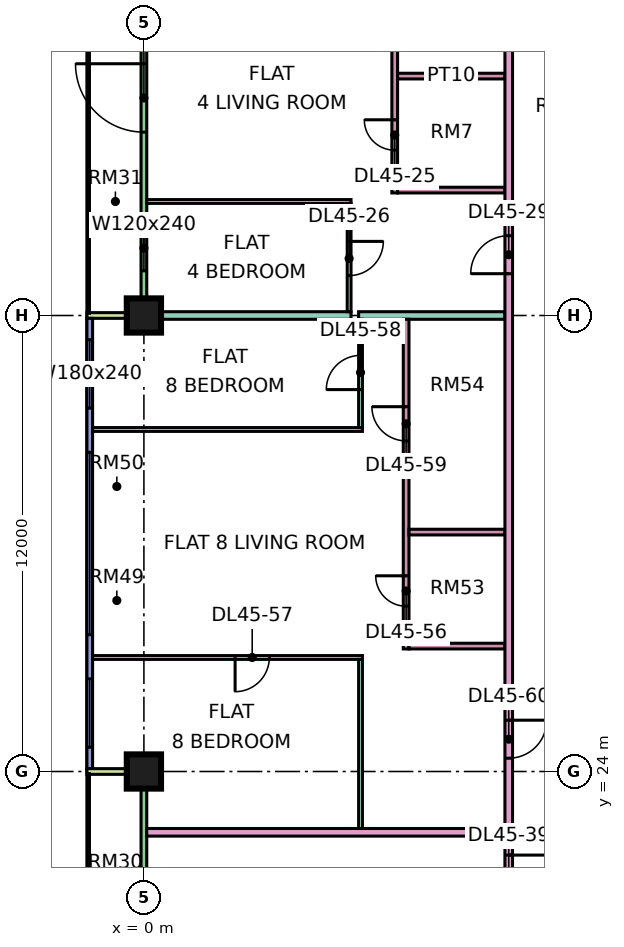
"""IFC4 building model, lengths in metres.
Left out: names, types, materials, properties, quantities, classifications, styles, units other than length and angle.
Written with IfcOpenShell. Run it as: python <this file> out.ifc"""

import sys

from ifc_helpers import new_model, si_unit, direction, frame, frame_2d, origin, origin_2d, place, context, subcontext, project, spatial, rectangle, extrude, element, fill, save


model = new_model("IFC4")
c1 = context("Model", 3, precision=1e-05, world=origin(), true_north=direction((0.0, 1.0)))
c2 = subcontext(c1, "Body", "Model", "MODEL_VIEW")
j1 = project(units=[si_unit("LENGTHUNIT", "METRE"), si_unit("PLANEANGLEUNIT", "RADIAN")], contexts=[c1])
p1 = place(None, origin())
s1 = spatial("IfcSite", under=j1, at=p1, CompositionType="ELEMENT")
p2 = place(p1, origin())
s2 = spatial("IfcBuilding", under=s1, at=p2, CompositionType="ELEMENT")
p3 = place(p2, frame((0.0, 0.0, 194.9)))
s3 = spatial("IfcBuildingStorey", under=s2, at=p3, CompositionType="ELEMENT", Elevation=194.9)
p4 = place(p3, frame((0.0, 24.0, 0.0), z_axis=(0.0, 0.0, 1.0), x_axis=(1.0, 0.0, 0.0)))
e1 = element("IfcColumn", 1, at=p4, inside=s3, PredefinedType="COLUMN", context=c2, shape_type="SweptSolid", body=[
    extrude(rectangle(XDim=0.9, YDim=0.9, at=origin_2d()), origin(), (0.0, 0.0, 1.0), 3.75),
])
p5 = place(p3, frame((0.0, 36.0, 0.0), z_axis=(0.0, 0.0, 1.0), x_axis=(1.0, 0.0, 0.0)))
e2 = element("IfcColumn", 2, at=p5, inside=s3, PredefinedType="COLUMN", context=c2, shape_type="SweptSolid", body=[
    extrude(rectangle(XDim=0.9, YDim=0.9, at=origin_2d()), origin(), (0.0, 0.0, 1.0), 3.75),
])
p6 = place(p3, frame((0.0, 47.925, 0.0), z_axis=(0.0, 0.0, 1.0), x_axis=(0.0, -1.0, 0.0)))
e3 = element("IfcWall", 3, at=p6, inside=s3, PredefinedType="SOLIDWALL", context=c2, shape_type="SweptSolid", body=[
    extrude(rectangle(XDim=11.85, YDim=0.15, at=frame_2d((5.925, 0.0))), origin(), (0.0, 0.0, 1.0), 3.35),
])
p7 = place(p6, frame((0.587, 0.0, 0.45)))
e4 = element("IfcOpeningElement", 4, at=p7, cuts=e3, PredefinedType="OPENING", context=c2, shape_type="SweptSolid", body=[
    extrude(rectangle(XDim=1.2, YDim=2.4, at=frame_2d((0.6, 1.2))), frame((0.0, 0.085, 0.0), z_axis=(0.0, -1.0, 0.0), x_axis=(1.0, 0.0, 0.0)), (0.0, 0.0, 1.0), 0.17),
])
p8 = place(p6, frame((5.3, 0.0, 0.0)))
e5 = element("IfcOpeningElement", 5, at=p8, cuts=e3, PredefinedType="OPENING", context=c2, shape_type="SweptSolid", body=[
    extrude(rectangle(XDim=1.8, YDim=2.4, at=frame_2d((0.9, 1.2))), frame((0.0, 0.085, 0.0), z_axis=(0.0, -1.0, 0.0), x_axis=(1.0, 0.0, 0.0)), (0.0, 0.0, 1.0), 0.17),
])
p9 = place(p6, frame((9.55, 0.0, 0.45)))
e6 = element("IfcOpeningElement", 6, at=p9, cuts=e3, PredefinedType="OPENING", context=c2, shape_type="SweptSolid", body=[
    extrude(rectangle(XDim=1.2, YDim=2.4, at=frame_2d((0.6, 1.2))), frame((0.0, 0.085, 0.0), z_axis=(0.0, -1.0, 0.0), x_axis=(1.0, 0.0, 0.0)), (0.0, 0.0, 1.0), 0.17),
])
p10 = place(p3, frame((-1.5, 36.0, 0.0), z_axis=(0.0, 0.0, 1.0), x_axis=(1.0, 0.0, 0.0)))
e7 = element("IfcWall", 7, at=p10, inside=s3, PredefinedType="SOLIDWALL", context=c2, shape_type="SweptSolid", body=[
    extrude(rectangle(XDim=1.5, YDim=0.15, at=frame_2d((0.75, 0.0))), origin(), (0.0, 0.0, 1.0), 3.35),
])
p11 = place(p3, frame((-1.425, 35.925, 0.0), z_axis=(0.0, 0.0, 1.0), x_axis=(0.0, -1.0, 0.0)))
e8 = element("IfcWall", 8, at=p11, inside=s3, PredefinedType="SOLIDWALL", context=c2, shape_type="SweptSolid", body=[
    extrude(rectangle(XDim=11.85, YDim=0.15, at=frame_2d((5.925, 0.0))), origin(), (0.0, 0.0, 1.0), 3.35),
])
p12 = place(p11, frame((0.562, 0.0, 0.45)))
e9 = element("IfcOpeningElement", 9, at=p12, cuts=e8, PredefinedType="OPENING", context=c2, shape_type="SweptSolid", body=[
    extrude(rectangle(XDim=1.8, YDim=2.4, at=frame_2d((0.9, 1.2))), frame((0.0, 0.085, 0.0), z_axis=(0.0, -1.0, 0.0), x_axis=(1.0, 0.0, 0.0)), (0.0, 0.0, 1.0), 0.17),
])
p13 = place(p11, frame((3.525, 0.0, 0.45)))
e10 = element("IfcOpeningElement", 10, at=p13, cuts=e8, PredefinedType="OPENING", context=c2, shape_type="SweptSolid", body=[
    extrude(rectangle(XDim=4.8, YDim=2.4, at=frame_2d((2.4, 1.2))), frame((0.0, 0.085, 0.0), z_axis=(0.0, -1.0, 0.0), x_axis=(1.0, 0.0, 0.0)), (0.0, 0.0, 1.0), 0.17),
])
p14 = place(p11, frame((9.488, 0.0, 0.45)))
e11 = element("IfcOpeningElement", 11, at=p14, cuts=e8, PredefinedType="OPENING", context=c2, shape_type="SweptSolid", body=[
    extrude(rectangle(XDim=1.8, YDim=2.4, at=frame_2d((0.9, 1.2))), frame((0.0, 0.085, 0.0), z_axis=(0.0, -1.0, 0.0), x_axis=(1.0, 0.0, 0.0)), (0.0, 0.0, 1.0), 0.17),
])
p15 = place(p3, frame((0.0, 23.925, 0.0), z_axis=(0.0, 0.0, 1.0), x_axis=(0.0, -1.0, 0.0)))
e12 = element("IfcWall", 12, at=p15, inside=s3, PredefinedType="SOLIDWALL", context=c2, shape_type="SweptSolid", body=[
    extrude(rectangle(XDim=11.35, YDim=0.15, at=frame_2d((5.675, 0.0))), origin(), (0.0, 0.0, 1.0), 3.35),
])
p16 = place(p15, frame((6.738, 0.0, 0.0)))
e13 = element("IfcOpeningElement", 13, at=p16, cuts=e12, PredefinedType="OPENING", context=c2, shape_type="SweptSolid", body=[
    extrude(rectangle(XDim=1.8, YDim=2.4, at=frame_2d((0.9, 1.2))), frame((0.0, 0.085, 0.0), z_axis=(0.0, -1.0, 0.0), x_axis=(1.0, 0.0, 0.0)), (0.0, 0.0, 1.0), 0.17),
])
p17 = place(p3, frame((-1.5, 24.0, 0.0), z_axis=(0.0, 0.0, 1.0), x_axis=(1.0, 0.0, 0.0)))
e14 = element("IfcWall", 14, at=p17, inside=s3, PredefinedType="SOLIDWALL", context=c2, shape_type="SweptSolid", body=[
    extrude(rectangle(XDim=1.5, YDim=0.15, at=frame_2d((0.75, 0.0))), origin(), (0.0, 0.0, 1.0), 3.35),
])
p18 = place(p3, frame((-1.35, 27.0, 0.0), z_axis=(0.0, 0.0, 1.0), x_axis=(1.0, 0.0, 0.0)))
e15 = element("IfcWall", 15, at=p18, inside=s3, PredefinedType="PARTITIONING", context=c2, shape_type="SweptSolid", body=[
    extrude(rectangle(XDim=7.1, YDim=0.1, at=frame_2d((3.55, 0.0))), origin(), (0.0, 0.0, 1.0), 3.35),
])
p19 = place(p18, frame((3.75, 0.0, 0.0)))
e16 = element("IfcOpeningElement", 16, at=p19, cuts=e15, PredefinedType="OPENING", context=c2, shape_type="SweptSolid", body=[
    extrude(rectangle(XDim=0.9, YDim=2.1, at=frame_2d((0.45, 1.05))), frame((0.0, 0.06, 0.0), z_axis=(0.0, -1.0, 0.0), x_axis=(1.0, 0.0, 0.0)), (0.0, 0.0, 1.0), 0.12),
])
p20 = place(p3, frame((-1.35, 33.0, 0.0), z_axis=(0.0, 0.0, 1.0), x_axis=(1.0, 0.0, 0.0)))
e17 = element("IfcWall", 17, at=p20, inside=s3, PredefinedType="PARTITIONING", context=c2, shape_type="SweptSolid", body=[
    extrude(rectangle(XDim=7.1, YDim=0.1, at=frame_2d((3.55, 0.0))), origin(), (0.0, 0.0, 1.0), 3.35),
])
e18 = element("IfcWall", 18, at=p5, inside=s3, PredefinedType="PARTITIONING", context=c2, shape_type="SweptSolid", body=[
    extrude(rectangle(XDim=5.45, YDim=0.2, at=frame_2d((2.725, 0.0))), origin(), (0.0, 0.0, 1.0), 3.35),
])
p21 = place(p3, frame((0.074, 22.4, 0.0), z_axis=(0.0, 0.0, 1.0), x_axis=(1.0, 0.0, 0.0)))
e19 = element("IfcWall", 19, at=p21, inside=s3, PredefinedType="PARTITIONING", context=c2, shape_type="SweptSolid", body=[
    extrude(rectangle(XDim=9.426, YDim=0.2, at=frame_2d((4.713, 0.0))), origin(), (0.0, 0.0, 1.0), 3.35),
])
p22 = place(p3, frame((0.074, 39.0, 0.0), z_axis=(0.0, 0.0, 1.0), x_axis=(1.0, 0.0, 0.0)))
e20 = element("IfcWall", 20, at=p22, inside=s3, PredefinedType="PARTITIONING", context=c2, shape_type="SweptSolid", body=[
    extrude(rectangle(XDim=5.376, YDim=0.1, at=frame_2d((2.688, 0.0))), origin(), (0.0, 0.0, 1.0), 3.35),
])
p23 = place(p3, frame((5.4, 36.1, 0.0), z_axis=(0.0, 0.0, 1.0), x_axis=(0.0, 1.0, 0.0)))
e21 = element("IfcWall", 21, at=p23, inside=s3, PredefinedType="PARTITIONING", context=c2, shape_type="SweptSolid", body=[
    extrude(rectangle(XDim=2.85, YDim=0.1, at=frame_2d((1.425, 0.0))), origin(), (0.0, 0.0, 1.0), 3.35),
])
p24 = place(p23, frame((0.95, 0.0, 0.0)))
e22 = element("IfcOpeningElement", 22, at=p24, cuts=e21, PredefinedType="OPENING", context=c2, shape_type="SweptSolid", body=[
    extrude(rectangle(XDim=0.9, YDim=2.1, at=frame_2d((0.45, 1.05))), frame((0.0, 0.06, 0.0), z_axis=(0.0, -1.0, 0.0), x_axis=(1.0, 0.0, 0.0)), (0.0, 0.0, 1.0), 0.12),
])
p25 = place(p3, frame((5.65, 36.0, 0.0), z_axis=(0.0, 0.0, 1.0), x_axis=(1.0, 0.0, 0.0)))
e23 = element("IfcWall", 23, at=p25, inside=s3, PredefinedType="PARTITIONING", context=c2, shape_type="SweptSolid", body=[
    extrude(rectangle(XDim=3.85, YDim=0.2, at=frame_2d((1.925, 0.0))), origin(), (0.0, 0.0, 1.0), 3.35),
])
p26 = place(p3, frame((5.7, 22.5, 0.0), z_axis=(0.0, 0.0, 1.0), x_axis=(0.0, 1.0, 0.0)))
e24 = element("IfcWall", 24, at=p26, inside=s3, PredefinedType="PARTITIONING", context=c2, shape_type="SweptSolid", body=[
    extrude(rectangle(XDim=4.45, YDim=0.1, at=frame_2d((2.225, 0.0))), origin(), (0.0, 0.0, 1.0), 3.35),
])
p27 = place(p3, frame((5.7, 33.05, 0.0), z_axis=(0.0, 0.0, 1.0), x_axis=(0.0, 1.0, 0.0)))
e25 = element("IfcWall", 25, at=p27, inside=s3, PredefinedType="PARTITIONING", context=c2, shape_type="SweptSolid", body=[
    extrude(rectangle(XDim=2.85, YDim=0.1, at=frame_2d((1.425, 0.0))), origin(), (0.0, 0.0, 1.0), 3.35),
])
p28 = place(p27, frame((1.0, 0.0, 0.0)))
e26 = element("IfcOpeningElement", 26, at=p28, cuts=e25, PredefinedType="OPENING", context=c2, shape_type="SweptSolid", body=[
    extrude(rectangle(XDim=0.9, YDim=2.1, at=frame_2d((0.45, 1.05))), frame((0.0, 0.06, 0.0), z_axis=(0.0, -1.0, 0.0), x_axis=(1.0, 0.0, 0.0)), (0.0, 0.0, 1.0), 0.12),
])
p29 = place(p3, frame((6.6, 39.225, 0.0), z_axis=(0.0, 0.0, 1.0), x_axis=(0.0, 1.0, 0.0)))
e27 = element("IfcWall", 27, at=p29, inside=s3, PredefinedType="PARTITIONING", context=c2, shape_type="SweptSolid", body=[
    extrude(rectangle(XDim=8.675, YDim=0.15, at=frame_2d((4.337, 0.0))), origin(), (0.0, 0.0, 1.0), 3.35),
])
p30 = place(p29, frame((1.125, 0.0, 0.0)))
e28 = element("IfcOpeningElement", 28, at=p30, cuts=e27, PredefinedType="OPENING", context=c2, shape_type="SweptSolid", body=[
    extrude(rectangle(XDim=0.8, YDim=2.1, at=frame_2d((0.4, 1.05))), frame((0.0, 0.085, 0.0), z_axis=(0.0, -1.0, 0.0), x_axis=(1.0, 0.0, 0.0)), (0.0, 0.0, 1.0), 0.17),
])
p31 = place(p29, frame((5.475, 0.0, 0.0)))
e29 = element("IfcOpeningElement", 29, at=p31, cuts=e27, PredefinedType="OPENING", context=c2, shape_type="SweptSolid", body=[
    extrude(rectangle(XDim=0.9, YDim=2.1, at=frame_2d((0.45, 1.05))), frame((0.0, 0.085, 0.0), z_axis=(0.0, -1.0, 0.0), x_axis=(1.0, 0.0, 0.0)), (0.0, 0.0, 1.0), 0.17),
])
for number, where, z_axis, x_axis in (
    (30, (6.675, 39.3, 0.0), (0.0, 0.0, 1.0), (1.0, 0.0, 0.0)),
    (31, (6.675, 42.3, 0.0), (0.0, 0.0, 1.0), (1.0, 0.0, 0.0)),
):
    element("IfcWall", number, at=place(p3, frame(where, z_axis=z_axis, x_axis=x_axis)), inside=s3, PredefinedType="PARTITIONING", context=c2, shape_type="SweptSolid", body=[
        extrude(rectangle(XDim=2.825, YDim=0.15, at=frame_2d((1.413, 0.0))), origin(), (0.0, 0.0, 1.0), 3.35),
    ])
p32 = place(p3, frame((6.9, 27.225, 0.0), z_axis=(0.0, 0.0, 1.0), x_axis=(0.0, 1.0, 0.0)))
e32 = element("IfcWall", 32, at=p32, inside=s3, PredefinedType="PARTITIONING", context=c2, shape_type="SweptSolid", body=[
    extrude(rectangle(XDim=8.675, YDim=0.15, at=frame_2d((4.337, 0.0))), origin(), (0.0, 0.0, 1.0), 3.35),
])
p33 = place(p32, frame((1.125, 0.0, 0.0)))
e33 = element("IfcOpeningElement", 33, at=p33, cuts=e32, PredefinedType="OPENING", context=c2, shape_type="SweptSolid", body=[
    extrude(rectangle(XDim=0.8, YDim=2.1, at=frame_2d((0.4, 1.05))), frame((0.0, 0.085, 0.0), z_axis=(0.0, -1.0, 0.0), x_axis=(1.0, 0.0, 0.0)), (0.0, 0.0, 1.0), 0.17),
])
p34 = place(p32, frame((5.475, 0.0, 0.0)))
e34 = element("IfcOpeningElement", 34, at=p34, cuts=e32, PredefinedType="OPENING", context=c2, shape_type="SweptSolid", body=[
    extrude(rectangle(XDim=0.9, YDim=2.1, at=frame_2d((0.45, 1.05))), frame((0.0, 0.085, 0.0), z_axis=(0.0, -1.0, 0.0), x_axis=(1.0, 0.0, 0.0)), (0.0, 0.0, 1.0), 0.17),
])
for number, where, z_axis, x_axis in (
    (35, (6.975, 27.3, 0.0), (0.0, 0.0, 1.0), (1.0, 0.0, 0.0)),
    (36, (6.975, 30.3, 0.0), (0.0, 0.0, 1.0), (1.0, 0.0, 0.0)),
):
    element("IfcWall", number, at=place(p3, frame(where, z_axis=z_axis, x_axis=x_axis)), inside=s3, PredefinedType="PARTITIONING", context=c2, shape_type="SweptSolid", body=[
        extrude(rectangle(XDim=2.525, YDim=0.15, at=frame_2d((1.262, 0.0))), origin(), (0.0, 0.0, 1.0), 3.35),
    ])
p35 = place(p3, frame((9.6, 20.0, 0.0), z_axis=(0.0, 0.0, 1.0), x_axis=(0.0, 1.0, 0.0)))
e37 = element("IfcWall", 37, at=p35, inside=s3, PredefinedType="PARTITIONING", context=c2, shape_type="SweptSolid", body=[
    extrude(rectangle(XDim=44.35, YDim=0.2, at=frame_2d((22.175, 0.0))), origin(), (0.0, 0.0, 1.0), 3.35),
])
p36 = place(p35, frame((17.1, 0.0, 0.0)))
e38 = element("IfcOpeningElement", 38, at=p36, cuts=e37, PredefinedType="OPENING", context=c2, shape_type="SweptSolid", body=[
    extrude(rectangle(XDim=1.0, YDim=2.1, at=frame_2d((0.5, 1.05))), frame((0.0, 0.11, 0.0), z_axis=(0.0, -1.0, 0.0), x_axis=(1.0, 0.0, 0.0)), (0.0, 0.0, 1.0), 0.22),
])
p37 = place(p35, frame((29.1, 0.0, 0.0)))
e39 = element("IfcOpeningElement", 39, at=p37, cuts=e37, PredefinedType="OPENING", context=c2, shape_type="SweptSolid", body=[
    extrude(rectangle(XDim=1.0, YDim=2.1, at=frame_2d((0.5, 1.05))), frame((0.0, 0.11, 0.0), z_axis=(0.0, -1.0, 0.0), x_axis=(1.0, 0.0, 0.0)), (0.0, 0.0, 1.0), 0.22),
])
p38 = place(p35, frame((0.6, 0.0, 0.0)))
e40 = element("IfcOpeningElement", 40, at=p38, cuts=e37, PredefinedType="OPENING", context=c2, shape_type="SweptSolid", body=[
    extrude(rectangle(XDim=1.2, YDim=2.1, at=frame_2d((0.6, 1.05))), frame((0.0, 0.11, 0.0), z_axis=(0.0, -1.0, 0.0), x_axis=(1.0, 0.0, 0.0)), (0.0, 0.0, 1.0), 0.22),
])
p39 = place(p35, frame((4.35, 0.0, 0.0)))
e41 = element("IfcOpeningElement", 41, at=p39, cuts=e37, PredefinedType="OPENING", context=c2, shape_type="SweptSolid", body=[
    extrude(rectangle(XDim=1.0, YDim=2.1, at=frame_2d((0.5, 1.05))), frame((0.0, 0.11, 0.0), z_axis=(0.0, -1.0, 0.0), x_axis=(1.0, 0.0, 0.0)), (0.0, 0.0, 1.0), 0.22),
])
p40 = place(p8, frame((1.8, 0.0, 0.0), z_axis=(0.0, 0.0, 1.0), x_axis=(-1.0, 0.0, 0.0)))
e42 = element("IfcDoor", 42, at=p40, inside=s3, OperationType="DOUBLE_DOOR_SINGLE_SWING", PredefinedType="DOOR", context=c2, shape_type="SweptSolid", body=[
    extrude(rectangle(XDim=1.8, YDim=2.4, at=frame_2d((0.9, 1.2))), frame((0.0, 0.025, 0.0), z_axis=(0.0, -1.0, 0.0), x_axis=(1.0, 0.0, 0.0)), (0.0, 0.0, 1.0), 0.05),
])
fill(e5, e42)
p41 = place(p9, origin())
e43 = element("IfcWindow", 43, at=p41, inside=s3, PartitioningType="SINGLE_PANEL", PredefinedType="WINDOW", context=c2, shape_type="SweptSolid", body=[
    extrude(rectangle(XDim=1.2, YDim=2.4, at=frame_2d((0.6, 1.2))), frame((0.0, 0.03, 0.0), z_axis=(0.0, -1.0, 0.0), x_axis=(1.0, 0.0, 0.0)), (0.0, 0.0, 1.0), 0.06),
])
fill(e6, e43)
p42 = place(p12, origin())
e44 = element("IfcWindow", 44, at=p42, inside=s3, PartitioningType="SINGLE_PANEL", PredefinedType="WINDOW", context=c2, shape_type="SweptSolid", body=[
    extrude(rectangle(XDim=1.8, YDim=2.4, at=frame_2d((0.9, 1.2))), frame((0.0, 0.03, 0.0), z_axis=(0.0, -1.0, 0.0), x_axis=(1.0, 0.0, 0.0)), (0.0, 0.0, 1.0), 0.06),
])
fill(e9, e44)
p43 = place(p13, origin())
e45 = element("IfcWindow", 45, at=p43, inside=s3, PartitioningType="SINGLE_PANEL", PredefinedType="WINDOW", context=c2, shape_type="SweptSolid", body=[
    extrude(rectangle(XDim=4.8, YDim=2.4, at=frame_2d((2.4, 1.2))), frame((0.0, 0.03, 0.0), z_axis=(0.0, -1.0, 0.0), x_axis=(1.0, 0.0, 0.0)), (0.0, 0.0, 1.0), 0.06),
])
fill(e10, e45)
p44 = place(p14, origin())
e46 = element("IfcWindow", 46, at=p44, inside=s3, PartitioningType="SINGLE_PANEL", PredefinedType="WINDOW", context=c2, shape_type="SweptSolid", body=[
    extrude(rectangle(XDim=1.8, YDim=2.4, at=frame_2d((0.9, 1.2))), frame((0.0, 0.03, 0.0), z_axis=(0.0, -1.0, 0.0), x_axis=(1.0, 0.0, 0.0)), (0.0, 0.0, 1.0), 0.06),
])
fill(e11, e46)
p45 = place(p30, frame((0.8, 0.0, 0.0), z_axis=(0.0, 0.0, 1.0), x_axis=(-1.0, 0.0, 0.0)))
e47 = element("IfcDoor", 47, at=p45, inside=s3, OperationType="SINGLE_SWING_RIGHT", PredefinedType="DOOR", context=c2, shape_type="SweptSolid", body=[
    extrude(rectangle(XDim=0.8, YDim=2.1, at=frame_2d((0.4, 1.05))), frame((0.0, 0.025, 0.0), z_axis=(0.0, -1.0, 0.0), x_axis=(1.0, 0.0, 0.0)), (0.0, 0.0, 1.0), 0.05),
])
fill(e28, e47)
p46 = place(p24, origin())
e48 = element("IfcDoor", 48, at=p46, inside=s3, OperationType="SINGLE_SWING_RIGHT", PredefinedType="DOOR", context=c2, shape_type="SweptSolid", body=[
    extrude(rectangle(XDim=0.9, YDim=2.1, at=frame_2d((0.45, 1.05))), frame((0.0, 0.025, 0.0), z_axis=(0.0, -1.0, 0.0), x_axis=(1.0, 0.0, 0.0)), (0.0, 0.0, 1.0), 0.05),
])
fill(e22, e48)
p47 = place(p36, origin())
e49 = element("IfcDoor", 49, at=p47, inside=s3, OperationType="SINGLE_SWING_LEFT", PredefinedType="DOOR", context=c2, shape_type="SweptSolid", body=[
    extrude(rectangle(XDim=1.0, YDim=2.1, at=frame_2d((0.5, 1.05))), frame((0.0, 0.025, 0.0), z_axis=(0.0, -1.0, 0.0), x_axis=(1.0, 0.0, 0.0)), (0.0, 0.0, 1.0), 0.05),
])
fill(e38, e49)
p48 = place(p38, origin())
e50 = element("IfcDoor", 50, at=p48, inside=s3, OperationType="SINGLE_SWING_RIGHT", PredefinedType="DOOR", context=c2, shape_type="SweptSolid", body=[
    extrude(rectangle(XDim=1.2, YDim=2.1, at=frame_2d((0.6, 1.05))), frame((0.0, 0.025, 0.0), z_axis=(0.0, -1.0, 0.0), x_axis=(1.0, 0.0, 0.0)), (0.0, 0.0, 1.0), 0.05),
])
fill(e40, e50)
p49 = place(p33, frame((0.8, 0.0, 0.0), z_axis=(0.0, 0.0, 1.0), x_axis=(-1.0, 0.0, 0.0)))
e51 = element("IfcDoor", 51, at=p49, inside=s3, OperationType="SINGLE_SWING_RIGHT", PredefinedType="DOOR", context=c2, shape_type="SweptSolid", body=[
    extrude(rectangle(XDim=0.8, YDim=2.1, at=frame_2d((0.4, 1.05))), frame((0.0, 0.025, 0.0), z_axis=(0.0, -1.0, 0.0), x_axis=(1.0, 0.0, 0.0)), (0.0, 0.0, 1.0), 0.05),
])
fill(e33, e51)
p50 = place(p19, frame((0.9, 0.0, 0.0), z_axis=(0.0, 0.0, 1.0), x_axis=(-1.0, 0.0, 0.0)))
e52 = element("IfcDoor", 52, at=p50, inside=s3, OperationType="SINGLE_SWING_LEFT", PredefinedType="DOOR", context=c2, shape_type="SweptSolid", body=[
    extrude(rectangle(XDim=0.9, YDim=2.1, at=frame_2d((0.45, 1.05))), frame((0.0, 0.025, 0.0), z_axis=(0.0, -1.0, 0.0), x_axis=(1.0, 0.0, 0.0)), (0.0, 0.0, 1.0), 0.05),
])
fill(e16, e52)
p51 = place(p28, origin())
e53 = element("IfcDoor", 53, at=p51, inside=s3, OperationType="SINGLE_SWING_LEFT", PredefinedType="DOOR", context=c2, shape_type="SweptSolid", body=[
    extrude(rectangle(XDim=0.9, YDim=2.1, at=frame_2d((0.45, 1.05))), frame((0.0, 0.025, 0.0), z_axis=(0.0, -1.0, 0.0), x_axis=(1.0, 0.0, 0.0)), (0.0, 0.0, 1.0), 0.05),
])
fill(e26, e53)
p52 = place(p34, frame((0.9, 0.0, 0.0), z_axis=(0.0, 0.0, 1.0), x_axis=(-1.0, 0.0, 0.0)))
e54 = element("IfcDoor", 54, at=p52, inside=s3, OperationType="SINGLE_SWING_RIGHT", PredefinedType="DOOR", context=c2, shape_type="SweptSolid", body=[
    extrude(rectangle(XDim=0.9, YDim=2.1, at=frame_2d((0.45, 1.05))), frame((0.0, 0.025, 0.0), z_axis=(0.0, -1.0, 0.0), x_axis=(1.0, 0.0, 0.0)), (0.0, 0.0, 1.0), 0.05),
])
fill(e34, e54)
p53 = place(p39, origin())
e55 = element("IfcDoor", 55, at=p53, inside=s3, OperationType="SINGLE_SWING_RIGHT", PredefinedType="DOOR", context=c2, shape_type="SweptSolid", body=[
    extrude(rectangle(XDim=1.0, YDim=2.1, at=frame_2d((0.5, 1.05))), frame((0.0, 0.025, 0.0), z_axis=(0.0, -1.0, 0.0), x_axis=(1.0, 0.0, 0.0)), (0.0, 0.0, 1.0), 0.05),
])
fill(e41, e55)
save(model, sys.argv[1])
